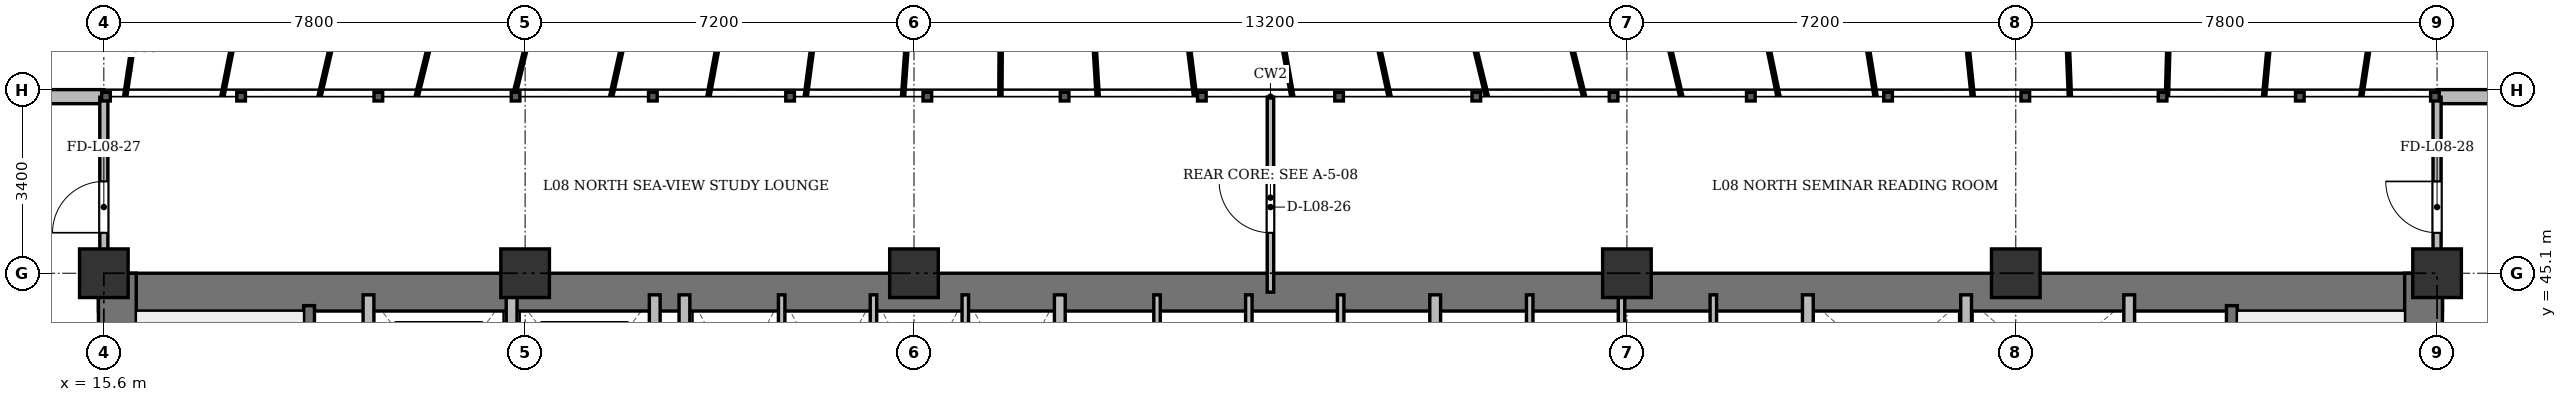
"""IFC4 building model, lengths in metres.
Left out: names, types, materials, properties, quantities, classifications, styles, units other than length and angle.
Written with IfcOpenShell. Run it as: python <this file> out.ifc"""

import sys

from ifc_helpers import new_model, si_unit, direction, frame, frame_2d, origin, origin_2d, place, context, subcontext, project, spatial, rectangle, extrude, source, transform, mapped, element, fill, save


model = new_model("IFC4")
c1 = context("Model", 3, precision=1e-05, world=origin(), true_north=direction((0.0, 1.0)))
c2 = subcontext(c1, "Body", "Model", "MODEL_VIEW")
j1 = project(units=[si_unit("LENGTHUNIT", "METRE"), si_unit("PLANEANGLEUNIT", "RADIAN")], contexts=[c1])
p1 = place(None, origin())
s1 = spatial("IfcSite", under=j1, at=p1, CompositionType="ELEMENT")
p2 = place(p1, origin())
s2 = spatial("IfcBuilding", under=s1, at=p2, CompositionType="ELEMENT")
p3 = place(p2, frame((0.0, 0.0, 34.3)))
s3 = spatial("IfcBuildingStorey", under=s2, at=p3, CompositionType="ELEMENT", Elevation=34.3)
m1 = source(origin(), c2, "Body", "SweptSolid", [
    extrude(rectangle(XDim=0.9, YDim=0.9, at=origin_2d()), origin(), (0.0, 0.0, 1.0), 3.6),
])
for number, where, z_axis, x_axis in (
    (1, (15.6, 45.1, 0.0), (0.0, 0.0, 1.0), (1.0, 0.0, 0.0)),
    (2, (23.4, 45.1, 0.0), (0.0, 0.0, 1.0), (1.0, 0.0, 0.0)),
    (3, (30.6, 45.1, 0.0), (0.0, 0.0, 1.0), (1.0, 0.0, 0.0)),
    (4, (43.8, 45.1, 0.0), (0.0, 0.0, 1.0), (1.0, 0.0, 0.0)),
    (5, (51.0, 45.1, 0.0), (0.0, 0.0, 1.0), (1.0, 0.0, 0.0)),
    (6, (58.8, 45.1, 0.0), (0.0, 0.0, 1.0), (1.0, 0.0, 0.0)),
):
    element("IfcColumn", number, at=place(p3, frame(where, z_axis=z_axis, x_axis=x_axis)), inside=s3, PredefinedType="COLUMN", context=c2, shape_type="MappedRepresentation", body=[
        mapped(m1, transform((0.0, 0.0, 0.0), x_axis=(1.0, 0.0, 0.0), y_axis=(0.0, 1.0, 0.0), z_axis=(0.0, 0.0, 1.0), scale=1.0)),
    ])
p4 = place(p3, frame((7.6, 48.37, 0.0), z_axis=(0.0, 0.0, 1.0), x_axis=(1.0, 0.0, 0.0)))
e7 = element("IfcWall", 7, at=p4, inside=s3, PredefinedType="SOLIDWALL", context=c2, shape_type="SweptSolid", body=[
    extrude(rectangle(XDim=8.0, YDim=0.26, at=frame_2d((4.0, 0.0))), origin(), (0.0, 0.0, 1.0), 3.34),
])
p5 = place(p4, frame((3.308, 0.0, 0.9)))
e8 = element("IfcOpeningElement", 8, at=p5, cuts=e7, PredefinedType="OPENING", context=c2, shape_type="SweptSolid", body=[
    extrude(rectangle(XDim=1.2, YDim=1.65, at=frame_2d((0.6, 0.825))), frame((0.0, 0.14, 0.0), z_axis=(0.0, -1.0, 0.0), x_axis=(1.0, 0.0, 0.0)), (0.0, 0.0, 1.0), 0.28),
])
p6 = place(p3, frame((58.8, 48.37, 0.0), z_axis=(0.0, 0.0, 1.0), x_axis=(1.0, 0.0, 0.0)))
e9 = element("IfcWall", 9, at=p6, inside=s3, PredefinedType="SOLIDWALL", context=c2, shape_type="SweptSolid", body=[
    extrude(rectangle(XDim=8.0, YDim=0.26, at=frame_2d((4.0, 0.0))), origin(), (0.0, 0.0, 1.0), 3.34),
])
p7 = place(p6, frame((3.308, 0.0, 0.9)))
e10 = element("IfcOpeningElement", 10, at=p7, cuts=e9, PredefinedType="OPENING", context=c2, shape_type="SweptSolid", body=[
    extrude(rectangle(XDim=1.2, YDim=1.65, at=frame_2d((0.6, 0.825))), frame((0.0, 0.14, 0.0), z_axis=(0.0, -1.0, 0.0), x_axis=(1.0, 0.0, 0.0)), (0.0, 0.0, 1.0), 0.28),
])
p8 = place(p3, frame((15.5, 44.75, 0.0), z_axis=(0.0, 0.0, 1.0), x_axis=(1.0, 0.0, 0.0)))
e11 = element("IfcWall", 11, at=p8, inside=s3, PredefinedType="SHEAR", context=c2, shape_type="SweptSolid", body=[
    extrude(rectangle(XDim=43.4, YDim=0.7, at=frame_2d((21.7, 0.0))), origin(), (0.0, 0.0, 1.0), 3.34),
])
for number, where, z_axis, x_axis in (
    (12, (15.85, 33.4, 0.0), (0.0, 0.0, 1.0), (0.0, 1.0, 0.0)),
    (13, (58.55, 33.4, 0.0), (0.0, 0.0, 1.0), (0.0, 1.0, 0.0)),
):
    element("IfcWall", number, at=place(p3, frame(where, z_axis=z_axis, x_axis=x_axis)), inside=s3, PredefinedType="SHEAR", context=c2, shape_type="SweptSolid", body=[
        extrude(rectangle(XDim=11.7, YDim=0.7, at=frame_2d((5.85, 0.0))), origin(), (0.0, 0.0, 1.0), 3.34),
    ])
p9 = place(p3, frame((19.4, 33.4, 0.0), z_axis=(0.0, 0.0, 1.0), x_axis=(0.0, 1.0, 0.0)))
e14 = element("IfcWall", 14, at=p9, inside=s3, PredefinedType="SHEAR", context=c2, shape_type="SweptSolid", body=[
    extrude(rectangle(XDim=11.1, YDim=0.2, at=frame_2d((5.55, 0.0))), origin(), (0.0, 0.0, 1.0), 3.34),
])
p10 = place(p9, frame((0.85, 0.0, 0.0)))
e15 = element("IfcOpeningElement", 15, at=p10, cuts=e14, PredefinedType="OPENING", context=c2, shape_type="SweptSolid", body=[
    extrude(rectangle(XDim=1.1, YDim=2.15, at=frame_2d((0.55, 1.075))), frame((0.0, 0.11, 0.0), z_axis=(0.0, -1.0, 0.0), x_axis=(1.0, 0.0, 0.0)), (0.0, 0.0, 1.0), 0.22),
])
p11 = place(p3, frame((55.0, 33.4, 0.0), z_axis=(0.0, 0.0, 1.0), x_axis=(0.0, 1.0, 0.0)))
e16 = element("IfcWall", 16, at=p11, inside=s3, PredefinedType="SHEAR", context=c2, shape_type="SweptSolid", body=[
    extrude(rectangle(XDim=11.1, YDim=0.2, at=frame_2d((5.55, 0.0))), origin(), (0.0, 0.0, 1.0), 3.34),
])
p12 = place(p11, frame((0.85, 0.0, 0.0)))
e17 = element("IfcOpeningElement", 17, at=p12, cuts=e16, PredefinedType="OPENING", context=c2, shape_type="SweptSolid", body=[
    extrude(rectangle(XDim=1.1, YDim=2.15, at=frame_2d((0.55, 1.075))), frame((0.0, 0.11, 0.0), z_axis=(0.0, -1.0, 0.0), x_axis=(1.0, 0.0, 0.0)), (0.0, 0.0, 1.0), 0.22),
])
for number, where, z_axis, x_axis in (
    (18, (20.5, 41.3, 0.0), (0.0, 0.0, 1.0), (0.0, 1.0, 0.0)),
    (19, (23.15, 41.3, 0.0), (0.0, 0.0, 1.0), (0.0, 1.0, 0.0)),
    (20, (25.8, 41.3, 0.0), (0.0, 0.0, 1.0), (0.0, 1.0, 0.0)),
):
    element("IfcWall", number, at=place(p3, frame(where, z_axis=z_axis, x_axis=x_axis)), inside=s3, PredefinedType="SOLIDWALL", context=c2, shape_type="SweptSolid", body=[
        extrude(rectangle(XDim=3.4, YDim=0.2, at=frame_2d((1.7, 0.0))), origin(), (0.0, 0.0, 1.0), 3.34),
    ])
p13 = place(p3, frame((26.35, 33.4, 0.0), z_axis=(0.0, 0.0, 1.0), x_axis=(0.0, 1.0, 0.0)))
e21 = element("IfcWall", 21, at=p13, inside=s3, PredefinedType="SOLIDWALL", context=c2, shape_type="SweptSolid", body=[
    extrude(rectangle(XDim=11.3, YDim=0.2, at=frame_2d((5.65, 0.0))), origin(), (0.0, 0.0, 1.0), 2.69),
])
p14 = place(p3, frame((33.3, 41.5, 0.0), z_axis=(0.0, 0.0, 1.0), x_axis=(0.0, 1.0, 0.0)))
e22 = element("IfcWall", 22, at=p14, inside=s3, PredefinedType="SOLIDWALL", context=c2, shape_type="SweptSolid", body=[
    extrude(rectangle(XDim=3.2, YDim=0.2, at=frame_2d((1.6, 0.0))), origin(), (0.0, 0.0, 1.0), 3.34),
])
for number, where, z_axis, x_axis in (
    (23, (28.15, 41.5, 0.0), (0.0, 0.0, 1.0), (0.0, 1.0, 0.0)),
    (24, (29.85, 41.5, 0.0), (0.0, 0.0, 1.0), (0.0, 1.0, 0.0)),
    (25, (31.55, 41.5, 0.0), (0.0, 0.0, 1.0), (0.0, 1.0, 0.0)),
    (26, (35.1, 41.5, 0.0), (0.0, 0.0, 1.0), (0.0, 1.0, 0.0)),
    (27, (36.8, 41.5, 0.0), (0.0, 0.0, 1.0), (0.0, 1.0, 0.0)),
    (28, (38.5, 41.5, 0.0), (0.0, 0.0, 1.0), (0.0, 1.0, 0.0)),
):
    element("IfcWall", number, at=place(p3, frame(where, z_axis=z_axis, x_axis=x_axis)), inside=s3, PredefinedType="PARTITIONING", context=c2, shape_type="SweptSolid", body=[
        extrude(rectangle(XDim=3.2, YDim=0.12, at=frame_2d((1.6, 0.0))), origin(), (0.0, 0.0, 1.0), 3.34),
    ])
p15 = place(p3, frame((40.25, 41.5, 0.0), z_axis=(0.0, 0.0, 1.0), x_axis=(0.0, 1.0, 0.0)))
e29 = element("IfcWall", 29, at=p15, inside=s3, PredefinedType="SOLIDWALL", context=c2, shape_type="SweptSolid", body=[
    extrude(rectangle(XDim=3.2, YDim=0.2, at=frame_2d((1.6, 0.0))), origin(), (0.0, 0.0, 1.0), 3.34),
])
p16 = place(p3, frame((42.0, 41.5, 0.0), z_axis=(0.0, 0.0, 1.0), x_axis=(0.0, 1.0, 0.0)))
e30 = element("IfcWall", 30, at=p16, inside=s3, PredefinedType="PARTITIONING", context=c2, shape_type="SweptSolid", body=[
    extrude(rectangle(XDim=3.2, YDim=0.12, at=frame_2d((1.6, 0.0))), origin(), (0.0, 0.0, 1.0), 3.34),
])
p17 = place(p3, frame((43.7, 41.5, 0.0), z_axis=(0.0, 0.0, 1.0), x_axis=(0.0, 1.0, 0.0)))
e31 = element("IfcWall", 31, at=p17, inside=s3, PredefinedType="PARTITIONING", context=c2, shape_type="SweptSolid", body=[
    extrude(rectangle(XDim=3.2, YDim=0.12, at=frame_2d((1.6, 0.0))), origin(), (0.0, 0.0, 1.0), 2.752),
])
p18 = place(p3, frame((45.4, 41.5, 0.0), z_axis=(0.0, 0.0, 1.0), x_axis=(0.0, 1.0, 0.0)))
e32 = element("IfcWall", 32, at=p18, inside=s3, PredefinedType="PARTITIONING", context=c2, shape_type="SweptSolid", body=[
    extrude(rectangle(XDim=3.2, YDim=0.12, at=frame_2d((1.6, 0.0))), origin(), (0.0, 0.0, 1.0), 3.34),
])
p19 = place(p3, frame((47.15, 33.4, 0.0), z_axis=(0.0, 0.0, 1.0), x_axis=(0.0, 1.0, 0.0)))
e33 = element("IfcWall", 33, at=p19, inside=s3, PredefinedType="SOLIDWALL", context=c2, shape_type="SweptSolid", body=[
    extrude(rectangle(XDim=11.3, YDim=0.2, at=frame_2d((5.65, 0.0))), origin(), (0.0, 0.0, 1.0), 2.69),
])
for number, where, z_axis, x_axis in (
    (34, (50.08, 42.05, 0.0), (0.0, 0.0, 1.0), (0.0, 1.0, 0.0)),
    (35, (53.1, 42.05, 0.0), (0.0, 0.0, 1.0), (0.0, 1.0, 0.0)),
):
    element("IfcWall", number, at=place(p3, frame(where, z_axis=z_axis, x_axis=x_axis)), inside=s3, PredefinedType="SOLIDWALL", context=c2, shape_type="SweptSolid", body=[
        extrude(rectangle(XDim=2.65, YDim=0.2, at=frame_2d((1.325, 0.0))), origin(), (0.0, 0.0, 1.0), 3.34),
    ])
p20 = place(p3, frame((37.2, 44.75, 0.0), z_axis=(0.0, 0.0, 1.0), x_axis=(0.0, 1.0, 0.0)))
e36 = element("IfcWall", 36, at=p20, inside=s3, PredefinedType="PARTITIONING", context=c2, shape_type="SweptSolid", body=[
    extrude(rectangle(XDim=3.61, YDim=0.12, at=frame_2d((1.805, 0.0))), origin(), (0.0, 0.0, 1.0), 2.69),
])
p21 = place(p20, frame((1.1, 0.0, 0.0)))
e37 = element("IfcOpeningElement", 37, at=p21, cuts=e36, PredefinedType="OPENING", context=c2, shape_type="SweptSolid", body=[
    extrude(rectangle(XDim=0.95, YDim=2.15, at=frame_2d((0.475, 1.075))), frame((0.0, 0.07, 0.0), z_axis=(0.0, -1.0, 0.0), x_axis=(1.0, 0.0, 0.0)), (0.0, 0.0, 1.0), 0.14),
])
p22 = place(p3, frame((15.6, 44.75, 0.0), z_axis=(0.0, 0.0, 1.0), x_axis=(0.0, 1.0, 0.0)))
e38 = element("IfcWall", 38, at=p22, inside=s3, PredefinedType="PARTITIONING", context=c2, shape_type="SweptSolid", body=[
    extrude(rectangle(XDim=3.61, YDim=0.15, at=frame_2d((1.805, 0.0))), origin(), (0.0, 0.0, 1.0), 2.752),
])
p23 = place(p22, frame((1.1, 0.0, 0.0)))
e39 = element("IfcOpeningElement", 39, at=p23, cuts=e38, PredefinedType="OPENING", context=c2, shape_type="SweptSolid", body=[
    extrude(rectangle(XDim=0.95, YDim=2.15, at=frame_2d((0.475, 1.075))), frame((0.0, 0.085, 0.0), z_axis=(0.0, -1.0, 0.0), x_axis=(1.0, 0.0, 0.0)), (0.0, 0.0, 1.0), 0.17),
])
p24 = place(p3, frame((58.8, 44.75, 0.0), z_axis=(0.0, 0.0, 1.0), x_axis=(0.0, 1.0, 0.0)))
e40 = element("IfcWall", 40, at=p24, inside=s3, PredefinedType="PARTITIONING", context=c2, shape_type="SweptSolid", body=[
    extrude(rectangle(XDim=3.61, YDim=0.15, at=frame_2d((1.805, 0.0))), origin(), (0.0, 0.0, 1.0), 2.752),
])
p25 = place(p24, frame((1.1, 0.0, 0.0)))
e41 = element("IfcOpeningElement", 41, at=p25, cuts=e40, PredefinedType="OPENING", context=c2, shape_type="SweptSolid", body=[
    extrude(rectangle(XDim=0.95, YDim=2.15, at=frame_2d((0.475, 1.075))), frame((0.0, 0.085, 0.0), z_axis=(0.0, -1.0, 0.0), x_axis=(1.0, 0.0, 0.0)), (0.0, 0.0, 1.0), 0.17),
])
m2 = source(origin(), c2, "Body", "SweptSolid", [
    extrude(rectangle(XDim=0.95, YDim=2.15, at=frame_2d((0.475, 1.075))), frame((0.0, 0.025, 0.0), z_axis=(0.0, -1.0, 0.0), x_axis=(1.0, 0.0, 0.0)), (0.0, 0.0, 1.0), 0.05),
])
p26 = place(p21, origin())
e42 = element("IfcDoor", 42, at=p26, inside=s3, OperationType="SINGLE_SWING_RIGHT", PredefinedType="DOOR", context=c2, shape_type="MappedRepresentation", body=[
    mapped(m2, transform((0.0, 0.0, 0.0), x_axis=(1.0, 0.0, 0.0), y_axis=(0.0, 1.0, 0.0), z_axis=(0.0, 0.0, 1.0), scale=1.0)),
])
fill(e37, e42)
p27 = place(p23, origin())
e43 = element("IfcDoor", 43, at=p27, inside=s3, OperationType="SINGLE_SWING_LEFT", PredefinedType="DOOR", context=c2, shape_type="MappedRepresentation", body=[
    mapped(m2, transform((0.0, 0.0, 0.0), x_axis=(1.0, 0.0, 0.0), y_axis=(0.0, 1.0, 0.0), z_axis=(0.0, 0.0, 1.0), scale=1.0)),
])
fill(e39, e43)
p28 = place(p25, origin())
e44 = element("IfcDoor", 44, at=p28, inside=s3, OperationType="SINGLE_SWING_RIGHT", PredefinedType="DOOR", context=c2, shape_type="MappedRepresentation", body=[
    mapped(m2, transform((0.0, 0.0, 0.0), x_axis=(1.0, 0.0, 0.0), y_axis=(0.0, 1.0, 0.0), z_axis=(0.0, 0.0, 1.0), scale=1.0)),
])
fill(e41, e44)
save(model, sys.argv[1])
